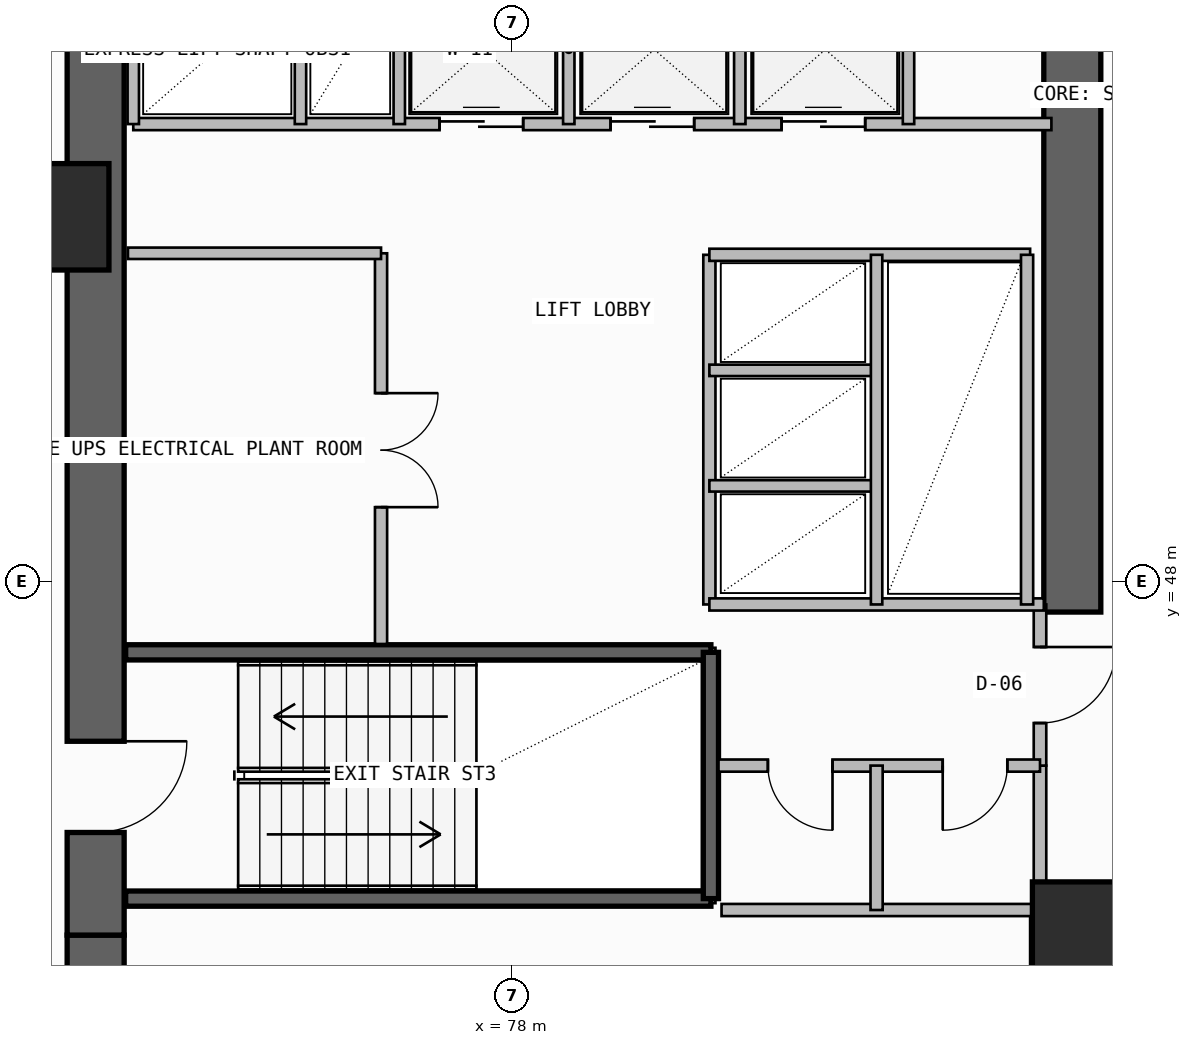
"""IFC4 building model, lengths in metres.
Left out: names, types, materials, properties, quantities, classifications, styles, units other than length and angle.
Written with IfcOpenShell. Run it as: python <this file> out.ifc"""

import sys

from ifc_helpers import new_model, si_unit, direction, frame, frame_2d, origin, origin_2d, place, context, subcontext, project, spatial, rectangle, extrude, element, fill, save


model = new_model("IFC4")
c1 = context("Model", 3, precision=1e-05, world=origin(), true_north=direction((0.0, 1.0)))
c2 = subcontext(c1, "Body", "Model", "MODEL_VIEW")
j1 = project(units=[si_unit("LENGTHUNIT", "METRE"), si_unit("PLANEANGLEUNIT", "RADIAN")], contexts=[c1])
p1 = place(None, origin())
s1 = spatial("IfcSite", under=j1, at=p1, CompositionType="ELEMENT")
p2 = place(p1, origin())
s2 = spatial("IfcBuilding", under=s1, at=p2, CompositionType="ELEMENT")
p3 = place(p2, frame((0.0, 0.0, 196.7)))
s3 = spatial("IfcBuildingStorey", under=s2, at=p3, CompositionType="ELEMENT", Elevation=196.7)
p4 = place(p3, frame((72.525, 35.5, -0.5), z_axis=(0.0, 0.0, 1.0), x_axis=(0.0, 1.0, 0.0)))
e1 = element("IfcWall", 1, at=p4, inside=s3, PredefinedType="SHEAR", context=c2, shape_type="SweptSolid", body=[
    extrude(rectangle(XDim=7.85, YDim=0.75, at=frame_2d((3.925, 0.0))), origin(), (0.0, 0.0, 1.0), 4.3),
])
p5 = place(p4, frame((1.45, 0.0, 0.5)))
e2 = element("IfcOpeningElement", 2, at=p5, cuts=e1, PredefinedType="OPENING", context=c2, shape_type="SweptSolid", body=[
    extrude(rectangle(XDim=1.2, YDim=2.2, at=frame_2d((0.6, 1.1))), frame((0.0, 0.385, 0.0), z_axis=(0.0, -1.0, 0.0), x_axis=(1.0, 0.0, 0.0)), (0.0, 0.0, 1.0), 0.77),
])
p6 = place(p3, frame((72.525, 43.35, -0.5), z_axis=(0.0, 0.0, 1.0), x_axis=(0.0, 1.0, 0.0)))
e3 = element("IfcWall", 3, at=p6, inside=s3, PredefinedType="SHEAR", context=c2, shape_type="SweptSolid", body=[
    extrude(rectangle(XDim=12.7, YDim=0.75, at=frame_2d((6.35, 0.0))), origin(), (0.0, 0.0, 1.0), 4.3),
])
p7 = place(p6, frame((1.35, 0.0, 0.5)))
e4 = element("IfcOpeningElement", 4, at=p7, cuts=e3, PredefinedType="OPENING", context=c2, shape_type="SweptSolid", body=[
    extrude(rectangle(XDim=1.2, YDim=2.2, at=frame_2d((0.6, 1.1))), frame((0.0, 0.385, 0.0), z_axis=(0.0, -1.0, 0.0), x_axis=(1.0, 0.0, 0.0)), (0.0, 0.0, 1.0), 0.77),
])
p8 = place(p3, frame((85.375, 47.6, -0.5), z_axis=(0.0, 0.0, 1.0), x_axis=(0.0, 1.0, 0.0)))
e5 = element("IfcWall", 5, at=p8, inside=s3, PredefinedType="SHEAR", context=c2, shape_type="SweptSolid", body=[
    extrude(rectangle(XDim=8.45, YDim=0.75, at=frame_2d((4.225, 0.0))), origin(), (0.0, 0.0, 1.0), 4.3),
])
for number, where, z_axis, x_axis in (
    (6, (85.55, 43.35, 0.0), (0.0, 0.0, 1.0), (1.0, 0.0, 0.0)),
    (7, (72.0, 52.8, 0.0), (0.0, 0.0, 1.0), (1.0, 0.0, 0.0)),
):
    element("IfcColumn", number, at=place(p3, frame(where, z_axis=z_axis, x_axis=x_axis)), inside=s3, PredefinedType="COLUMN", context=c2, shape_type="SweptSolid", body=[
        extrude(rectangle(XDim=1.4, YDim=1.4, at=origin_2d()), origin(), (0.0, 0.0, 1.0), 4.2),
    ])
p9 = place(p3, frame((84.92, 38.85, 0.0), z_axis=(0.0, 0.0, 1.0), x_axis=(0.0, 1.0, 0.0)))
e8 = element("IfcWall", 8, at=p9, inside=s3, PredefinedType="SOLIDWALL", context=c2, shape_type="SweptSolid", body=[
    extrude(rectangle(XDim=4.83, YDim=0.2, at=frame_2d((2.415, 0.0))), origin(), (0.0, 0.0, 1.0), 3.8),
])
p10 = place(p9, frame((1.25, 0.0, 0.0)))
e9 = element("IfcOpeningElement", 9, at=p10, cuts=e8, PredefinedType="OPENING", context=c2, shape_type="SweptSolid", body=[
    extrude(rectangle(XDim=1.1, YDim=2.2, at=frame_2d((0.55, 1.1))), frame((0.0, 0.11, 0.0), z_axis=(0.0, -1.0, 0.0), x_axis=(1.0, 0.0, 0.0)), (0.0, 0.0, 1.0), 0.22),
])
for number, where, z_axis, x_axis in (
    (10, (72.92, 43.83, -0.5), (0.0, 0.0, 1.0), (1.0, 0.0, 0.0)),
    (11, (72.92, 47.07, -0.5), (0.0, 0.0, 1.0), (1.0, 0.0, 0.0)),
):
    element("IfcWall", number, at=place(p3, frame(where, z_axis=z_axis, x_axis=x_axis)), inside=s3, PredefinedType="SOLIDWALL", context=c2, shape_type="SweptSolid", body=[
        extrude(rectangle(XDim=7.7, YDim=0.2, at=frame_2d((3.85, 0.0))), origin(), (0.0, 0.0, 1.0), 4.3),
    ])
p11 = place(p3, frame((80.62, 43.83, -0.5), z_axis=(0.0, 0.0, 1.0), x_axis=(0.0, 1.0, 0.0)))
e12 = element("IfcWall", 12, at=p11, inside=s3, PredefinedType="SOLIDWALL", context=c2, shape_type="SweptSolid", body=[
    extrude(rectangle(XDim=3.24, YDim=0.2, at=frame_2d((1.62, 0.0))), origin(), (0.0, 0.0, 1.0), 4.3),
])
p12 = place(p3, frame((84.95, 43.68, 0.0), z_axis=(0.0, 0.0, 1.0), x_axis=(0.0, 1.0, 0.0)))
e13 = element("IfcWall", 13, at=p12, inside=s3, PredefinedType="PLUMBINGWALL", context=c2, shape_type="SweptSolid", body=[
    extrude(rectangle(XDim=1.9, YDim=0.165, at=frame_2d((0.95, 0.0))), origin(), (0.0, 0.0, 1.0), 3.8),
])
p13 = place(p3, frame((84.95, 45.58, 0.0), z_axis=(0.0, 0.0, 1.0), x_axis=(0.0, 1.0, 0.0)))
e14 = element("IfcWall", 14, at=p13, inside=s3, PredefinedType="PARTITIONING", context=c2, shape_type="SweptSolid", body=[
    extrude(rectangle(XDim=2.12, YDim=0.165, at=frame_2d((1.06, 0.0))), origin(), (0.0, 0.0, 1.0), 3.8),
])
p14 = place(p13, frame((0.56, 0.0, 0.0)))
e15 = element("IfcOpeningElement", 15, at=p14, cuts=e14, PredefinedType="OPENING", context=c2, shape_type="SweptSolid", body=[
    extrude(rectangle(XDim=1.0, YDim=2.2, at=frame_2d((0.5, 1.1))), frame((0.0, 0.093, 0.0), z_axis=(0.0, -1.0, 0.0), x_axis=(1.0, 0.0, 0.0)), (0.0, 0.0, 1.0), 0.185),
])
p15 = place(p3, frame((80.72, 45.58, 0.0), z_axis=(0.0, 0.0, 1.0), x_axis=(1.0, 0.0, 0.0)))
e16 = element("IfcWall", 16, at=p15, inside=s3, PredefinedType="PLUMBINGWALL", context=c2, shape_type="SweptSolid", body=[
    extrude(rectangle(XDim=4.23, YDim=0.16, at=frame_2d((2.115, 0.0))), origin(), (0.0, 0.0, 1.0), 3.8),
])
p16 = place(p15, frame((0.65, 0.0, 0.0)))
e17 = element("IfcOpeningElement", 17, at=p16, cuts=e16, PredefinedType="OPENING", context=c2, shape_type="SweptSolid", body=[
    extrude(rectangle(XDim=0.85, YDim=2.05, at=frame_2d((0.425, 1.025))), frame((0.0, 0.09, 0.0), z_axis=(0.0, -1.0, 0.0), x_axis=(1.0, 0.0, 0.0)), (0.0, 0.0, 1.0), 0.18),
])
p17 = place(p15, frame((2.95, 0.0, 0.0)))
e18 = element("IfcOpeningElement", 18, at=p17, cuts=e16, PredefinedType="OPENING", context=c2, shape_type="SweptSolid", body=[
    extrude(rectangle(XDim=0.85, YDim=2.05, at=frame_2d((0.425, 1.025))), frame((0.0, 0.09, 0.0), z_axis=(0.0, -1.0, 0.0), x_axis=(1.0, 0.0, 0.0)), (0.0, 0.0, 1.0), 0.18),
])
p18 = place(p3, frame((80.76, 43.68, 0.0), z_axis=(0.0, 0.0, 1.0), x_axis=(1.0, 0.0, 0.0)))
e19 = element("IfcWall", 19, at=p18, inside=s3, PredefinedType="PLUMBINGWALL", context=c2, shape_type="SweptSolid", body=[
    extrude(rectangle(XDim=4.19, YDim=0.16, at=frame_2d((2.095, 0.0))), origin(), (0.0, 0.0, 1.0), 3.8),
])
p19 = place(p3, frame((82.8, 43.68, 0.0), z_axis=(0.0, 0.0, 1.0), x_axis=(0.0, 1.0, 0.0)))
e20 = element("IfcWall", 20, at=p19, inside=s3, PredefinedType="PLUMBINGWALL", context=c2, shape_type="SweptSolid", body=[
    extrude(rectangle(XDim=1.9, YDim=0.16, at=frame_2d((0.95, 0.0))), origin(), (0.0, 0.0, 1.0), 3.8),
])
p20 = place(p3, frame((76.28, 47.18, 0.0), z_axis=(0.0, 0.0, 1.0), x_axis=(0.0, 1.0, 0.0)))
e21 = element("IfcWall", 21, at=p20, inside=s3, PredefinedType="SOLIDWALL", context=c2, shape_type="SweptSolid", body=[
    extrude(rectangle(XDim=5.14, YDim=0.16, at=frame_2d((2.57, 0.0))), origin(), (0.0, 0.0, 1.0), 3.8),
])
p21 = place(p20, frame((1.8, 0.0, 0.0)))
e22 = element("IfcOpeningElement", 22, at=p21, cuts=e21, PredefinedType="OPENING", context=c2, shape_type="SweptSolid", body=[
    extrude(rectangle(XDim=1.5, YDim=2.25, at=frame_2d((0.75, 1.125))), frame((0.0, 0.09, 0.0), z_axis=(0.0, -1.0, 0.0), x_axis=(1.0, 0.0, 0.0)), (0.0, 0.0, 1.0), 0.18),
])
p22 = place(p3, frame((72.95, 52.32, 0.0), z_axis=(0.0, 0.0, 1.0), x_axis=(1.0, 0.0, 0.0)))
e23 = element("IfcWall", 23, at=p22, inside=s3, PredefinedType="SOLIDWALL", context=c2, shape_type="SweptSolid", body=[
    extrude(rectangle(XDim=3.33, YDim=0.15, at=frame_2d((1.665, 0.0))), origin(), (0.0, 0.0, 1.0), 3.8),
])
p23 = place(p3, frame((80.6, 47.7, 0.0), z_axis=(0.0, 0.0, 1.0), x_axis=(0.0, 1.0, 0.0)))
e24 = element("IfcWall", 24, at=p23, inside=s3, PredefinedType="SOLIDWALL", context=c2, shape_type="SweptSolid", body=[
    extrude(rectangle(XDim=4.6, YDim=0.16, at=frame_2d((2.3, 0.0))), origin(), (0.0, 0.0, 1.0), 3.8),
])
p24 = place(p3, frame((80.6, 47.7, 0.0), z_axis=(0.0, 0.0, 1.0), x_axis=(1.0, 0.0, 0.0)))
e25 = element("IfcWall", 25, at=p24, inside=s3, PredefinedType="SOLIDWALL", context=c2, shape_type="SweptSolid", body=[
    extrude(rectangle(XDim=4.4, YDim=0.16, at=frame_2d((2.2, 0.0))), origin(), (0.0, 0.0, 1.0), 3.8),
])
p25 = place(p3, frame((80.6, 52.3, 0.0), z_axis=(0.0, 0.0, 1.0), x_axis=(1.0, 0.0, 0.0)))
e26 = element("IfcWall", 26, at=p25, inside=s3, PredefinedType="SOLIDWALL", context=c2, shape_type="SweptSolid", body=[
    extrude(rectangle(XDim=4.22, YDim=0.16, at=frame_2d((2.11, 0.0))), origin(), (0.0, 0.0, 1.0), 3.8),
])
for number, where, z_axis, x_axis in (
    (27, (80.6, 49.26, 0.0), (0.0, 0.0, 1.0), (1.0, 0.0, 0.0)),
    (28, (80.6, 50.78, 0.0), (0.0, 0.0, 1.0), (1.0, 0.0, 0.0)),
):
    element("IfcWall", number, at=place(p3, frame(where, z_axis=z_axis, x_axis=x_axis)), inside=s3, PredefinedType="PLUMBINGWALL", context=c2, shape_type="SweptSolid", body=[
        extrude(rectangle(XDim=2.2, YDim=0.15, at=frame_2d((1.1, 0.0))), origin(), (0.0, 0.0, 1.0), 3.8),
    ])
p26 = place(p3, frame((82.8, 47.7, 0.0), z_axis=(0.0, 0.0, 1.0), x_axis=(0.0, 1.0, 0.0)))
e29 = element("IfcWall", 29, at=p26, inside=s3, PredefinedType="PLUMBINGWALL", context=c2, shape_type="SweptSolid", body=[
    extrude(rectangle(XDim=4.6, YDim=0.15, at=frame_2d((2.3, 0.0))), origin(), (0.0, 0.0, 1.0), 3.8),
])
p27 = place(p3, frame((84.78, 47.7, 0.0), z_axis=(0.0, 0.0, 1.0), x_axis=(0.0, 1.0, 0.0)))
e30 = element("IfcWall", 30, at=p27, inside=s3, PredefinedType="SOLIDWALL", context=c2, shape_type="SweptSolid", body=[
    extrude(rectangle(XDim=4.6, YDim=0.16, at=frame_2d((2.3, 0.0))), origin(), (0.0, 0.0, 1.0), 3.8),
])
p28 = place(p3, frame((73.02, 54.02, 0.0), z_axis=(0.0, 0.0, 1.0), x_axis=(1.0, 0.0, 0.0)))
e31 = element("IfcWall", 31, at=p28, inside=s3, PredefinedType="SOLIDWALL", context=c2, shape_type="SweptSolid", body=[
    extrude(rectangle(XDim=12.08, YDim=0.16, at=frame_2d((6.04, 0.0))), origin(), (0.0, 0.0, 1.0), 3.8),
])
p29 = place(p28, frame((4.03, 0.0, 0.0)))
e32 = element("IfcOpeningElement", 32, at=p29, cuts=e31, PredefinedType="OPENING", context=c2, shape_type="SweptSolid", body=[
    extrude(rectangle(XDim=1.1, YDim=2.25, at=frame_2d((0.55, 1.125))), frame((0.0, 0.09, 0.0), z_axis=(0.0, -1.0, 0.0), x_axis=(1.0, 0.0, 0.0)), (0.0, 0.0, 1.0), 0.18),
])
p30 = place(p28, frame((6.28, 0.0, 0.0)))
e33 = element("IfcOpeningElement", 33, at=p30, cuts=e31, PredefinedType="OPENING", context=c2, shape_type="SweptSolid", body=[
    extrude(rectangle(XDim=1.1, YDim=2.25, at=frame_2d((0.55, 1.125))), frame((0.0, 0.09, 0.0), z_axis=(0.0, -1.0, 0.0), x_axis=(1.0, 0.0, 0.0)), (0.0, 0.0, 1.0), 0.18),
])
p31 = place(p28, frame((8.53, 0.0, 0.0)))
e34 = element("IfcOpeningElement", 34, at=p31, cuts=e31, PredefinedType="OPENING", context=c2, shape_type="SweptSolid", body=[
    extrude(rectangle(XDim=1.1, YDim=2.25, at=frame_2d((0.55, 1.125))), frame((0.0, 0.09, 0.0), z_axis=(0.0, -1.0, 0.0), x_axis=(1.0, 0.0, 0.0)), (0.0, 0.0, 1.0), 0.18),
])
p32 = place(p3, frame((73.02, 54.02, 0.0), z_axis=(0.0, 0.0, 1.0), x_axis=(0.0, 1.0, 0.0)))
e35 = element("IfcWall", 35, at=p32, inside=s3, PredefinedType="PLUMBINGWALL", context=c2, shape_type="SweptSolid", body=[
    extrude(rectangle(XDim=1.94, YDim=0.15, at=frame_2d((0.97, 0.0))), origin(), (0.0, 0.0, 1.0), 3.8),
])
p33 = place(p3, frame((76.52, 54.02, 0.0), z_axis=(0.0, 0.0, 1.0), x_axis=(0.0, 1.0, 0.0)))
e36 = element("IfcWall", 36, at=p33, inside=s3, PredefinedType="SOLIDWALL", context=c2, shape_type="SweptSolid", body=[
    extrude(rectangle(XDim=1.94, YDim=0.15, at=frame_2d((0.97, 0.0))), origin(), (0.0, 0.0, 1.0), 3.8),
])
p34 = place(p3, frame((75.22, 54.02, 0.0), z_axis=(0.0, 0.0, 1.0), x_axis=(0.0, 1.0, 0.0)))
e37 = element("IfcWall", 37, at=p34, inside=s3, PredefinedType="PLUMBINGWALL", context=c2, shape_type="SweptSolid", body=[
    extrude(rectangle(XDim=1.94, YDim=0.15, at=frame_2d((0.97, 0.0))), origin(), (0.0, 0.0, 1.0), 3.8),
])
for number, where, z_axis, x_axis in (
    (38, (78.75, 54.02, 0.0), (0.0, 0.0, 1.0), (0.0, 1.0, 0.0)),
    (39, (81.0, 54.02, 0.0), (0.0, 0.0, 1.0), (0.0, 1.0, 0.0)),
):
    element("IfcWall", number, at=place(p3, frame(where, z_axis=z_axis, x_axis=x_axis)), inside=s3, PredefinedType="PLUMBINGWALL", context=c2, shape_type="SweptSolid", body=[
        extrude(rectangle(XDim=1.96, YDim=0.15, at=frame_2d((0.98, 0.0))), origin(), (0.0, 0.0, 1.0), 3.8),
    ])
p35 = place(p3, frame((83.22, 54.02, 0.0), z_axis=(0.0, 0.0, 1.0), x_axis=(0.0, 1.0, 0.0)))
e40 = element("IfcWall", 40, at=p35, inside=s3, PredefinedType="SOLIDWALL", context=c2, shape_type="SweptSolid", body=[
    extrude(rectangle(XDim=1.96, YDim=0.15, at=frame_2d((0.98, 0.0))), origin(), (0.0, 0.0, 1.0), 3.8),
])
p36 = place(p7, frame((1.2, 0.0, 0.0), z_axis=(0.0, 0.0, 1.0), x_axis=(-1.0, 0.0, 0.0)))
e41 = element("IfcDoor", 41, at=p36, inside=s3, OperationType="SINGLE_SWING_LEFT", PredefinedType="USERDEFINED", context=c2, shape_type="SweptSolid", body=[
    extrude(rectangle(XDim=1.2, YDim=2.2, at=frame_2d((0.6, 1.1))), frame((0.0, 0.025, 0.0), z_axis=(0.0, -1.0, 0.0), x_axis=(1.0, 0.0, 0.0)), (0.0, 0.0, 1.0), 0.05),
])
fill(e4, e41)
p37 = place(p14, frame((1.0, 0.0, 0.0), z_axis=(0.0, 0.0, 1.0), x_axis=(-1.0, 0.0, 0.0)))
e42 = element("IfcDoor", 42, at=p37, inside=s3, OperationType="SINGLE_SWING_LEFT", PredefinedType="DOOR", context=c2, shape_type="SweptSolid", body=[
    extrude(rectangle(XDim=1.0, YDim=2.2, at=frame_2d((0.5, 1.1))), frame((0.0, 0.025, 0.0), z_axis=(0.0, -1.0, 0.0), x_axis=(1.0, 0.0, 0.0)), (0.0, 0.0, 1.0), 0.05),
])
fill(e15, e42)
p38 = place(p16, frame((0.85, 0.0, 0.0), z_axis=(0.0, 0.0, 1.0), x_axis=(-1.0, 0.0, 0.0)))
e43 = element("IfcDoor", 43, at=p38, inside=s3, OperationType="SINGLE_SWING_LEFT", PredefinedType="DOOR", context=c2, shape_type="SweptSolid", body=[
    extrude(rectangle(XDim=0.85, YDim=2.05, at=frame_2d((0.425, 1.025))), frame((0.0, 0.025, 0.0), z_axis=(0.0, -1.0, 0.0), x_axis=(1.0, 0.0, 0.0)), (0.0, 0.0, 1.0), 0.05),
])
fill(e17, e43)
p39 = place(p17, frame((0.85, 0.0, 0.0), z_axis=(0.0, 0.0, 1.0), x_axis=(-1.0, 0.0, 0.0)))
e44 = element("IfcDoor", 44, at=p39, inside=s3, OperationType="SINGLE_SWING_RIGHT", PredefinedType="DOOR", context=c2, shape_type="SweptSolid", body=[
    extrude(rectangle(XDim=0.85, YDim=2.05, at=frame_2d((0.425, 1.025))), frame((0.0, 0.025, 0.0), z_axis=(0.0, -1.0, 0.0), x_axis=(1.0, 0.0, 0.0)), (0.0, 0.0, 1.0), 0.05),
])
fill(e18, e44)
p40 = place(p21, frame((1.5, 0.0, 0.0), z_axis=(0.0, 0.0, 1.0), x_axis=(-1.0, 0.0, 0.0)))
e45 = element("IfcDoor", 45, at=p40, inside=s3, OperationType="DOUBLE_DOOR_SINGLE_SWING", PredefinedType="DOOR", context=c2, shape_type="SweptSolid", body=[
    extrude(rectangle(XDim=1.5, YDim=2.25, at=frame_2d((0.75, 1.125))), frame((0.0, 0.025, 0.0), z_axis=(0.0, -1.0, 0.0), x_axis=(1.0, 0.0, 0.0)), (0.0, 0.0, 1.0), 0.05),
])
fill(e22, e45)
p41 = place(p29, origin())
e46 = element("IfcDoor", 46, at=p41, inside=s3, OperationType="DOUBLE_DOOR_SLIDING", PredefinedType="DOOR", context=c2, shape_type="SweptSolid", body=[
    extrude(rectangle(XDim=1.1, YDim=2.25, at=frame_2d((0.55, 1.125))), frame((0.0, 0.025, 0.0), z_axis=(0.0, -1.0, 0.0), x_axis=(1.0, 0.0, 0.0)), (0.0, 0.0, 1.0), 0.05),
])
fill(e32, e46)
p42 = place(p30, origin())
e47 = element("IfcDoor", 47, at=p42, inside=s3, OperationType="DOUBLE_DOOR_SLIDING", PredefinedType="DOOR", context=c2, shape_type="SweptSolid", body=[
    extrude(rectangle(XDim=1.1, YDim=2.25, at=frame_2d((0.55, 1.125))), frame((0.0, 0.025, 0.0), z_axis=(0.0, -1.0, 0.0), x_axis=(1.0, 0.0, 0.0)), (0.0, 0.0, 1.0), 0.05),
])
fill(e33, e47)
p43 = place(p31, origin())
e48 = element("IfcDoor", 48, at=p43, inside=s3, OperationType="DOUBLE_DOOR_SLIDING", PredefinedType="DOOR", context=c2, shape_type="SweptSolid", body=[
    extrude(rectangle(XDim=1.1, YDim=2.25, at=frame_2d((0.55, 1.125))), frame((0.0, 0.025, 0.0), z_axis=(0.0, -1.0, 0.0), x_axis=(1.0, 0.0, 0.0)), (0.0, 0.0, 1.0), 0.05),
])
fill(e34, e48)
save(model, sys.argv[1])
